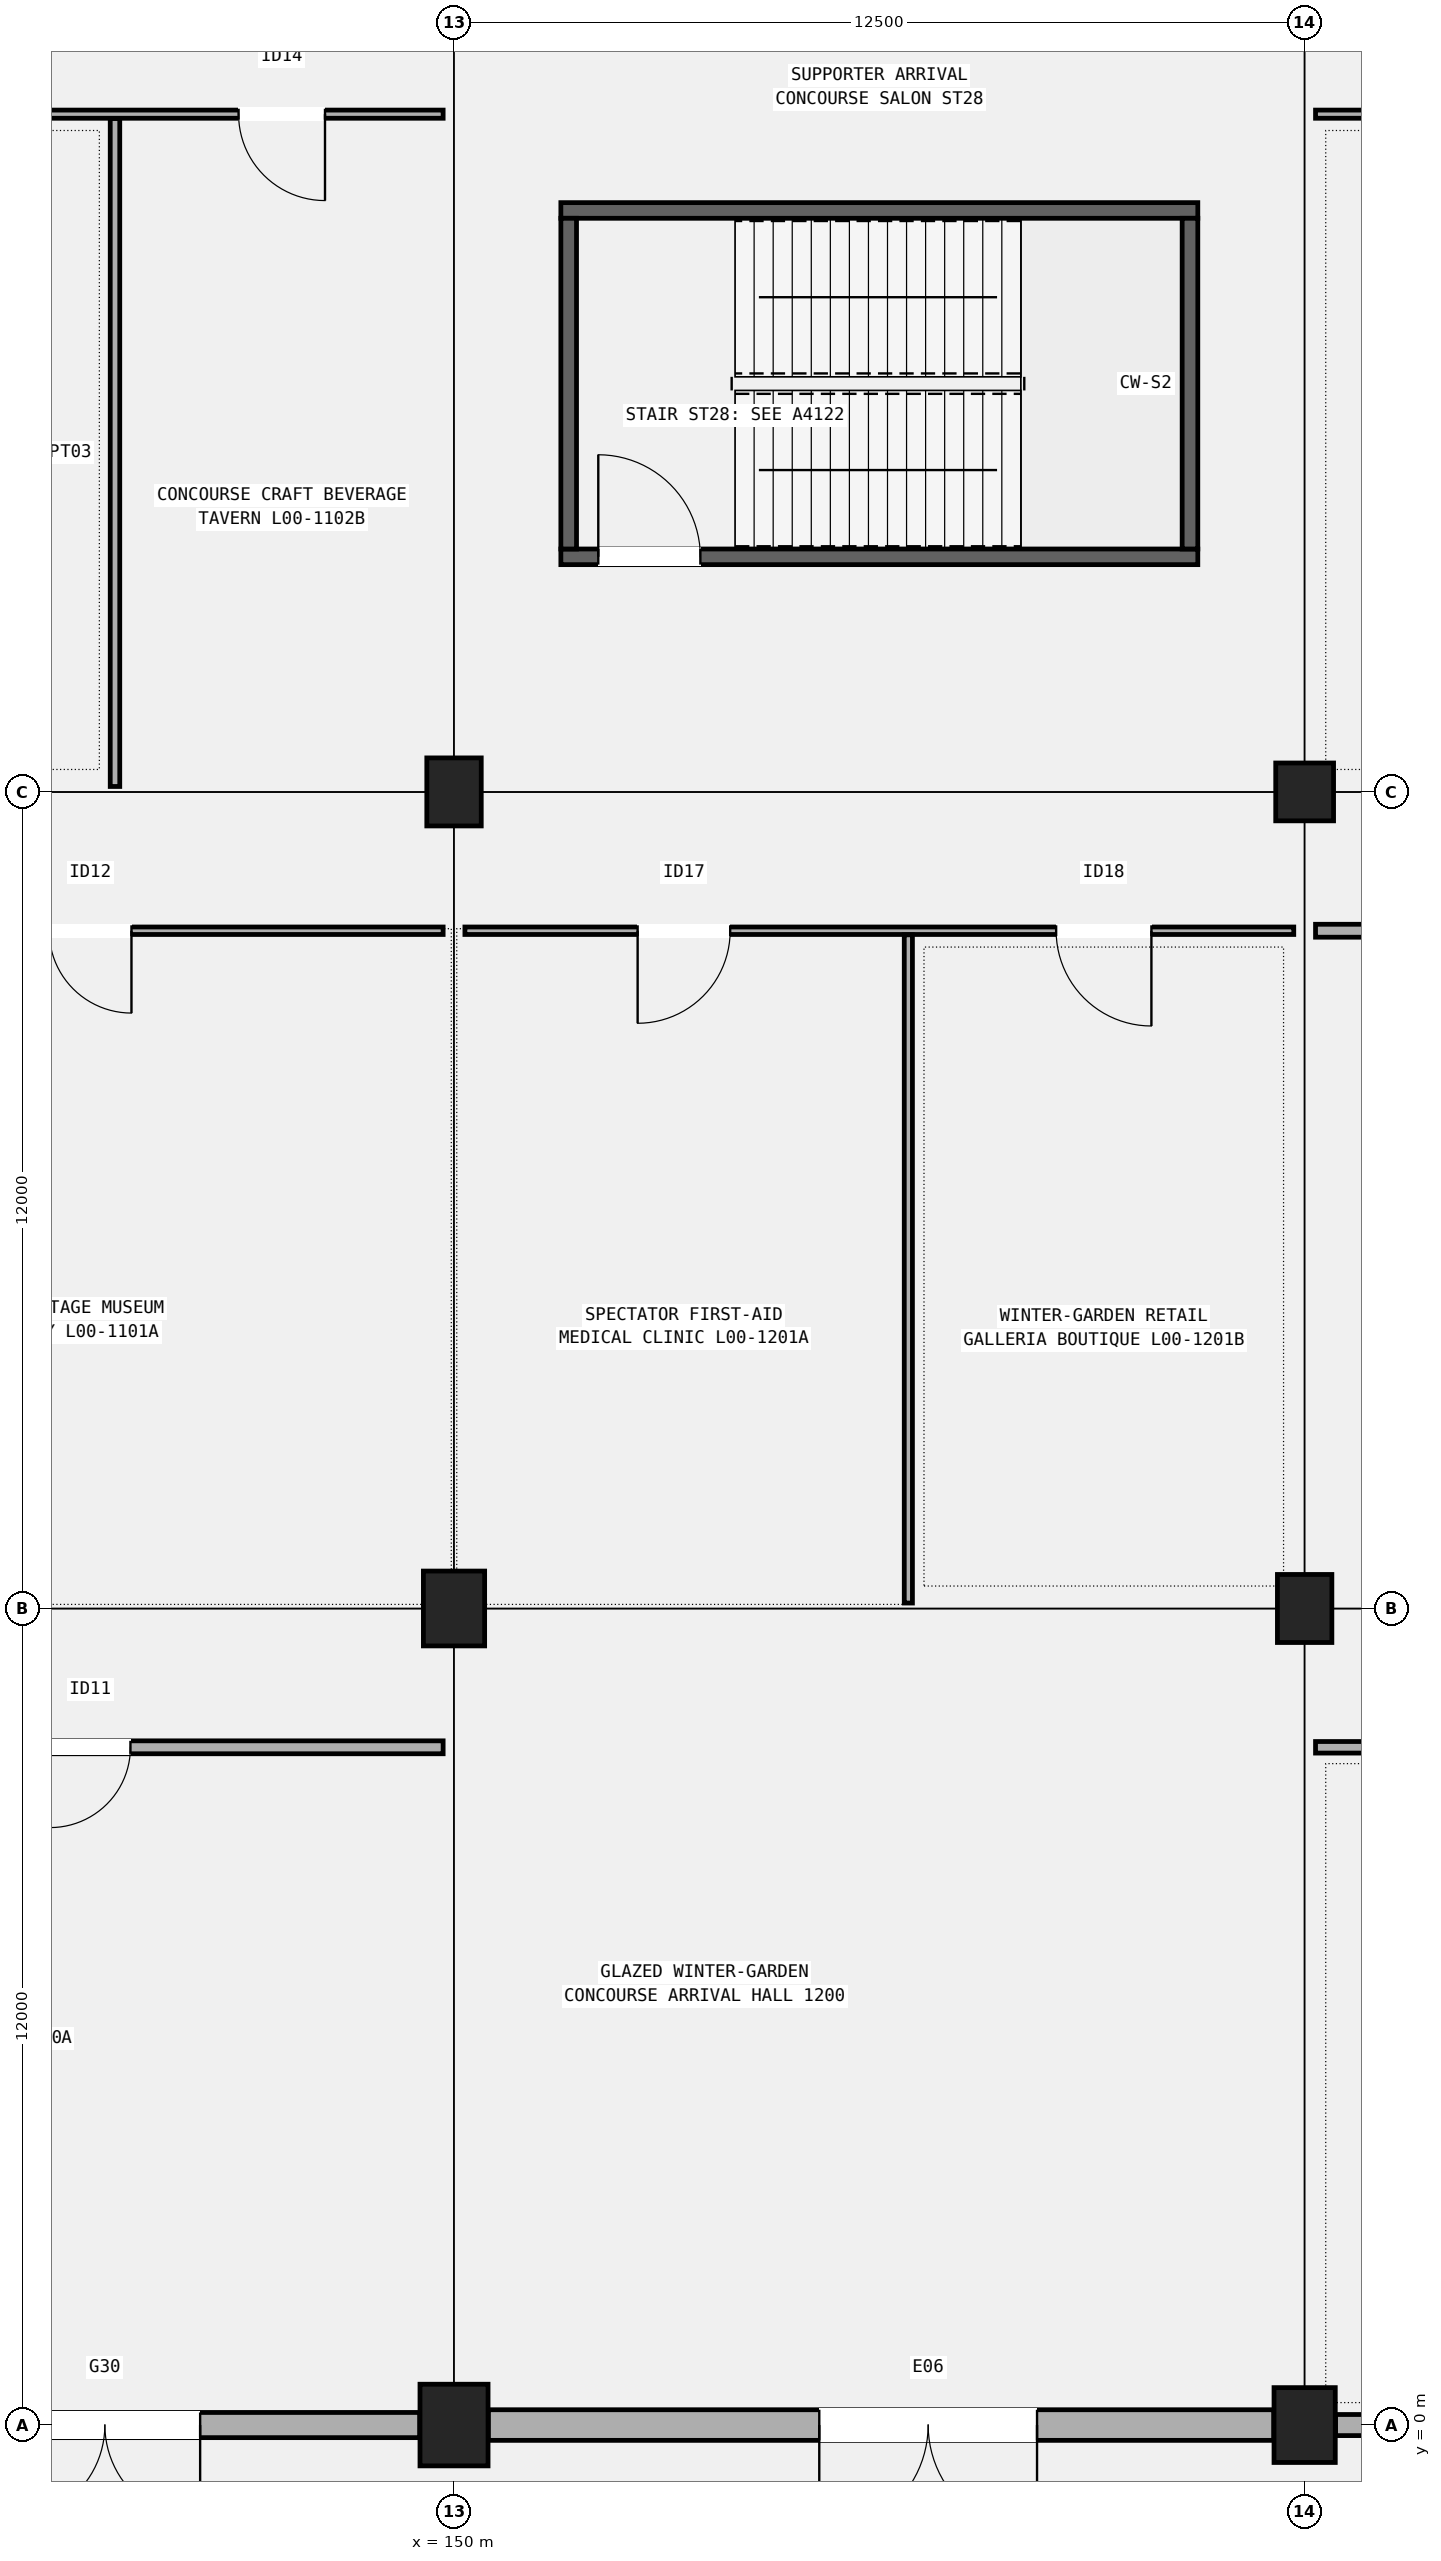
"""IFC4 building model, lengths in metres.
Left out: names, types, materials, properties, quantities, classifications, styles, units other than length and angle.
Written with IfcOpenShell. Run it as: python <this file> out.ifc"""

import sys

from ifc_helpers import new_model, si_unit, direction, frame, frame_2d, origin, origin_2d, place, context, subcontext, project, spatial, rectangle, circle, extrude, element, fill, save


model = new_model("IFC4")
c1 = context("Model", 3, precision=1e-05, world=origin(), true_north=direction((0.0, 1.0)))
c2 = subcontext(c1, "Body", "Model", "MODEL_VIEW")
j1 = project(units=[si_unit("LENGTHUNIT", "METRE"), si_unit("PLANEANGLEUNIT", "RADIAN")], contexts=[c1])
p1 = place(None, origin())
s1 = spatial("IfcSite", under=j1, at=p1, CompositionType="ELEMENT")
p2 = place(p1, origin())
s2 = spatial("IfcBuilding", under=s1, at=p2, CompositionType="ELEMENT")
p3 = place(p2, origin())
s3 = spatial("IfcBuildingStorey", under=s2, at=p3, CompositionType="ELEMENT", Elevation=0.0)
p4 = place(p3, frame((150.0, 0.0, 0.0), z_axis=(0.0, 0.0, 1.0), x_axis=(1.0, 0.0, 0.0)))
e1 = element("IfcColumn", 1, at=p4, inside=s3, PredefinedType="COLUMN", context=c2, shape_type="SweptSolid", body=[
    extrude(rectangle(XDim=1.0, YDim=1.2, at=origin_2d()), origin(), (0.0, 0.0, 1.0), 5.4),
])
p5 = place(p3, frame((150.0, 12.0, 0.0), z_axis=(0.0, 0.0, 1.0), x_axis=(1.0, 0.0, 0.0)))
e2 = element("IfcColumn", 2, at=p5, inside=s3, PredefinedType="COLUMN", context=c2, shape_type="SweptSolid", body=[
    extrude(rectangle(XDim=0.9, YDim=1.1, at=origin_2d()), origin(), (0.0, 0.0, 1.0), 5.4),
])
p6 = place(p3, frame((150.0, 24.0, 0.0), z_axis=(0.0, 0.0, 1.0), x_axis=(1.0, 0.0, 0.0)))
e3 = element("IfcColumn", 3, at=p6, inside=s3, PredefinedType="COLUMN", context=c2, shape_type="SweptSolid", body=[
    extrude(rectangle(XDim=0.8, YDim=1.0, at=origin_2d()), origin(), (0.0, 0.0, 1.0), 5.4),
])
p7 = place(p3, frame((162.5, 0.0, 0.0), z_axis=(0.0, 0.0, 1.0), x_axis=(1.0, 0.0, 0.0)))
e4 = element("IfcColumn", 4, at=p7, inside=s3, PredefinedType="COLUMN", context=c2, shape_type="SweptSolid", body=[
    extrude(rectangle(XDim=0.9, YDim=1.1, at=origin_2d()), origin(), (0.0, 0.0, 1.0), 5.4),
])
p8 = place(p3, frame((162.5, 12.0, 0.0), z_axis=(0.0, 0.0, 1.0), x_axis=(1.0, 0.0, 0.0)))
e5 = element("IfcColumn", 5, at=p8, inside=s3, PredefinedType="COLUMN", context=c2, shape_type="SweptSolid", body=[
    extrude(rectangle(XDim=0.8, YDim=1.0, at=origin_2d()), origin(), (0.0, 0.0, 1.0), 5.4),
])
p9 = place(p3, frame((162.5, 24.0, 0.0), z_axis=(0.0, 0.0, 1.0), x_axis=(1.0, 0.0, 0.0)))
e6 = element("IfcColumn", 6, at=p9, inside=s3, PredefinedType="COLUMN", context=c2, shape_type="SweptSolid", body=[
    extrude(circle(Radius=0.425, at=origin_2d()), origin(), (0.0, 0.0, 1.0), 5.4),
])
p10 = place(p3, frame((137.929, 0.0, 0.0), z_axis=(0.0, 0.0, 1.0), x_axis=(1.0, 0.0, 0.0)))
e7 = element("IfcWall", 7, at=p10, inside=s3, PredefinedType="SOLIDWALL", context=c2, shape_type="SweptSolid", body=[
    extrude(rectangle(XDim=11.567, YDim=0.37, at=frame_2d((5.784, 0.0))), origin(), (0.0, 0.0, 1.0), 4.34),
])
p11 = place(p10, frame((8.34, 0.0, 0.0), z_axis=(0.0, 0.0, 1.0), x_axis=(-1.0, 0.0, 0.0)))
e8 = element("IfcOpeningElement", 8, at=p11, cuts=e7, PredefinedType="OPENING", context=c2, shape_type="SweptSolid", body=[
    extrude(rectangle(XDim=2.8, YDim=2.4, at=frame_2d((1.4, 1.2))), frame((0.0, 0.195, 0.0), z_axis=(0.0, -1.0, 0.0), x_axis=(1.0, 0.0, 0.0)), (0.0, 0.0, 1.0), 0.39),
])
p12 = place(p3, frame((150.504, 0.0, 0.0), z_axis=(0.0, 0.0, 1.0), x_axis=(1.0, 0.0, 0.0)))
e9 = element("IfcWall", 9, at=p12, inside=s3, PredefinedType="SOLIDWALL", context=c2, shape_type="SweptSolid", body=[
    extrude(rectangle(XDim=11.542, YDim=0.45, at=frame_2d((5.771, 0.0))), origin(), (0.0, 0.0, 1.0), 4.09),
])
p13 = place(p12, frame((8.063, 0.0, 0.0), z_axis=(0.0, 0.0, 1.0), x_axis=(-1.0, 0.0, 0.0)))
e10 = element("IfcOpeningElement", 10, at=p13, cuts=e9, PredefinedType="OPENING", context=c2, shape_type="SweptSolid", body=[
    extrude(rectangle(XDim=3.2, YDim=2.6, at=frame_2d((1.6, 1.3))), frame((0.0, 0.235, 0.0), z_axis=(0.0, -1.0, 0.0), x_axis=(1.0, 0.0, 0.0)), (0.0, 0.0, 1.0), 0.47),
])
p14 = place(p3, frame((162.954, 0.0, 0.0), z_axis=(0.0, 0.0, 1.0), x_axis=(1.0, 0.0, 0.0)))
e11 = element("IfcWall", 11, at=p14, inside=s3, PredefinedType="SOLIDWALL", context=c2, shape_type="SweptSolid", body=[
    extrude(rectangle(XDim=11.642, YDim=0.31, at=frame_2d((5.821, 0.0))), origin(), (0.0, 0.0, 1.0), 4.24),
])
p15 = place(p14, frame((1.5, 0.0, 0.95)))
e12 = element("IfcOpeningElement", 12, at=p15, cuts=e11, PredefinedType="OPENING", context=c2, shape_type="SweptSolid", body=[
    extrude(rectangle(XDim=2.1, YDim=2.6, at=frame_2d((1.05, 1.3))), frame((0.0, 0.165, 0.0), z_axis=(0.0, -1.0, 0.0), x_axis=(1.0, 0.0, 0.0)), (0.0, 0.0, 1.0), 0.33),
])
p16 = place(p3, frame((151.57, 27.455, 0.0), z_axis=(0.0, 0.0, 1.0), x_axis=(1.0, 0.0, 0.0)))
e13 = element("IfcWall", 13, at=p16, inside=s3, PredefinedType="SHEAR", context=c2, shape_type="SweptSolid", body=[
    extrude(rectangle(XDim=9.36, YDim=0.23, at=frame_2d((4.68, 0.0))), origin(), (0.0, 0.0, 1.0), 5.14),
])
p17 = place(p16, frame((0.55, 0.0, 0.0)))
e14 = element("IfcOpeningElement", 14, at=p17, cuts=e13, PredefinedType="OPENING", context=c2, shape_type="SweptSolid", body=[
    extrude(rectangle(XDim=1.5, YDim=2.2, at=frame_2d((0.75, 1.1))), frame((0.0, 0.125, 0.0), z_axis=(0.0, -1.0, 0.0), x_axis=(1.0, 0.0, 0.0)), (0.0, 0.0, 1.0), 0.25),
])
p18 = place(p3, frame((151.57, 32.545, 0.0), z_axis=(0.0, 0.0, 1.0), x_axis=(1.0, 0.0, 0.0)))
e15 = element("IfcWall", 15, at=p18, inside=s3, PredefinedType="SHEAR", context=c2, shape_type="SweptSolid", body=[
    extrude(rectangle(XDim=9.36, YDim=0.23, at=frame_2d((4.68, 0.0))), origin(), (0.0, 0.0, 1.0), 5.14),
])
for number, where, z_axis, x_axis in (
    (16, (151.685, 27.57, 0.0), (0.0, 0.0, 1.0), (0.0, 1.0, 0.0)),
    (17, (160.815, 27.57, 0.0), (0.0, 0.0, 1.0), (0.0, 1.0, 0.0)),
):
    element("IfcWall", number, at=place(p3, frame(where, z_axis=z_axis, x_axis=x_axis)), inside=s3, PredefinedType="SHEAR", context=c2, shape_type="SweptSolid", body=[
        extrude(rectangle(XDim=4.86, YDim=0.23, at=frame_2d((2.43, 0.0))), origin(), (0.0, 0.0, 1.0), 5.14),
    ])
p19 = place(p3, frame((139.47, 9.96, 0.0), z_axis=(0.0, 0.0, 1.0), x_axis=(1.0, 0.0, 0.0)))
e18 = element("IfcWall", 18, at=p19, inside=s3, PredefinedType="PARTITIONING", context=c2, shape_type="SweptSolid", body=[
    extrude(rectangle(XDim=10.37, YDim=0.19, at=frame_2d((5.185, 0.0))), origin(), (0.0, 0.0, 1.0), 4.52),
])
p20 = place(p19, frame((5.775, 0.0, 0.0), z_axis=(0.0, 0.0, 1.0), x_axis=(-1.0, 0.0, 0.0)))
e19 = element("IfcOpeningElement", 19, at=p20, cuts=e18, PredefinedType="OPENING", context=c2, shape_type="SweptSolid", body=[
    extrude(rectangle(XDim=1.18, YDim=2.2, at=frame_2d((0.59, 1.1))), frame((0.0, 0.105, 0.0), z_axis=(0.0, -1.0, 0.0), x_axis=(1.0, 0.0, 0.0)), (0.0, 0.0, 1.0), 0.21),
])
p21 = place(p3, frame((139.47, 21.96, 0.0), z_axis=(0.0, 0.0, 1.0), x_axis=(1.0, 0.0, 0.0)))
e20 = element("IfcWall", 20, at=p21, inside=s3, PredefinedType="PARTITIONING", context=c2, shape_type="SweptSolid", body=[
    extrude(rectangle(XDim=10.37, YDim=0.11, at=frame_2d((5.185, 0.0))), origin(), (0.0, 0.0, 1.0), 4.52),
])
p22 = place(p21, frame((5.79, 0.0, 0.0), z_axis=(0.0, 0.0, 1.0), x_axis=(-1.0, 0.0, 0.0)))
e21 = element("IfcOpeningElement", 21, at=p22, cuts=e20, PredefinedType="OPENING", context=c2, shape_type="SweptSolid", body=[
    extrude(rectangle(XDim=1.21, YDim=2.18, at=frame_2d((0.605, 1.09))), frame((0.0, 0.065, 0.0), z_axis=(0.0, -1.0, 0.0), x_axis=(1.0, 0.0, 0.0)), (0.0, 0.0, 1.0), 0.13),
])
p23 = place(p3, frame((139.47, 33.96, 0.0), z_axis=(0.0, 0.0, 1.0), x_axis=(1.0, 0.0, 0.0)))
e22 = element("IfcWall", 22, at=p23, inside=s3, PredefinedType="PARTITIONING", context=c2, shape_type="SweptSolid", body=[
    extrude(rectangle(XDim=10.37, YDim=0.12, at=frame_2d((5.185, 0.0))), origin(), (0.0, 0.0, 1.0), 4.52),
])
p24 = place(p23, frame((3.354, 0.0, 0.0), z_axis=(0.0, 0.0, 1.0), x_axis=(-1.0, 0.0, 0.0)))
e23 = element("IfcOpeningElement", 23, at=p24, cuts=e22, PredefinedType="OPENING", context=c2, shape_type="SweptSolid", body=[
    extrude(rectangle(XDim=1.24, YDim=2.22, at=frame_2d((0.62, 1.11))), frame((0.0, 0.07, 0.0), z_axis=(0.0, -1.0, 0.0), x_axis=(1.0, 0.0, 0.0)), (0.0, 0.0, 1.0), 0.14),
])
p25 = place(p23, frame((8.634, 0.0, 0.0), z_axis=(0.0, 0.0, 1.0), x_axis=(-1.0, 0.0, 0.0)))
e24 = element("IfcOpeningElement", 24, at=p25, cuts=e22, PredefinedType="OPENING", context=c2, shape_type="SweptSolid", body=[
    extrude(rectangle(XDim=1.27, YDim=2.2, at=frame_2d((0.635, 1.1))), frame((0.0, 0.07, 0.0), z_axis=(0.0, -1.0, 0.0), x_axis=(1.0, 0.0, 0.0)), (0.0, 0.0, 1.0), 0.14),
])
p26 = place(p3, frame((145.018, 24.08, 0.0), z_axis=(0.0, 0.0, 1.0), x_axis=(0.0, 1.0, 0.0)))
e25 = element("IfcWall", 25, at=p26, inside=s3, PredefinedType="PARTITIONING", context=c2, shape_type="SweptSolid", body=[
    extrude(rectangle(XDim=9.815, YDim=0.14, at=frame_2d((4.907, 0.0))), origin(), (0.0, 0.0, 1.0), 4.52),
])
p27 = place(p3, frame((150.16, 21.96, 0.0), z_axis=(0.0, 0.0, 1.0), x_axis=(1.0, 0.0, 0.0)))
e26 = element("IfcWall", 26, at=p27, inside=s3, PredefinedType="PARTITIONING", context=c2, shape_type="SweptSolid", body=[
    extrude(rectangle(XDim=12.18, YDim=0.11, at=frame_2d((6.09, 0.0))), origin(), (0.0, 0.0, 1.0), 4.52),
])
p28 = place(p27, frame((3.898, 0.0, 0.0), z_axis=(0.0, 0.0, 1.0), x_axis=(-1.0, 0.0, 0.0)))
e27 = element("IfcOpeningElement", 27, at=p28, cuts=e26, PredefinedType="OPENING", context=c2, shape_type="SweptSolid", body=[
    extrude(rectangle(XDim=1.36, YDim=2.25, at=frame_2d((0.68, 1.125))), frame((0.0, 0.065, 0.0), z_axis=(0.0, -1.0, 0.0), x_axis=(1.0, 0.0, 0.0)), (0.0, 0.0, 1.0), 0.13),
])
p29 = place(p27, frame((10.088, 0.0, 0.0), z_axis=(0.0, 0.0, 1.0), x_axis=(-1.0, 0.0, 0.0)))
e28 = element("IfcOpeningElement", 28, at=p29, cuts=e26, PredefinedType="OPENING", context=c2, shape_type="SweptSolid", body=[
    extrude(rectangle(XDim=1.4, YDim=2.24, at=frame_2d((0.7, 1.12))), frame((0.0, 0.065, 0.0), z_axis=(0.0, -1.0, 0.0), x_axis=(1.0, 0.0, 0.0)), (0.0, 0.0, 1.0), 0.13),
])
p30 = place(p3, frame((156.676, 12.08, 0.0), z_axis=(0.0, 0.0, 1.0), x_axis=(0.0, 1.0, 0.0)))
e29 = element("IfcWall", 29, at=p30, inside=s3, PredefinedType="PARTITIONING", context=c2, shape_type="SweptSolid", body=[
    extrude(rectangle(XDim=9.82, YDim=0.12, at=frame_2d((4.91, 0.0))), origin(), (0.0, 0.0, 1.0), 4.52),
])
p31 = place(p3, frame((162.66, 9.96, 0.0), z_axis=(0.0, 0.0, 1.0), x_axis=(1.0, 0.0, 0.0)))
e30 = element("IfcWall", 30, at=p31, inside=s3, PredefinedType="PARTITIONING", context=c2, shape_type="SweptSolid", body=[
    extrude(rectangle(XDim=12.198, YDim=0.17, at=frame_2d((6.099, 0.0))), origin(), (0.0, 0.0, 1.0), 4.52),
])
p32 = place(p31, frame((6.85, 0.0, 0.0), z_axis=(0.0, 0.0, 1.0), x_axis=(-1.0, 0.0, 0.0)))
e31 = element("IfcOpeningElement", 31, at=p32, cuts=e30, PredefinedType="OPENING", context=c2, shape_type="SweptSolid", body=[
    extrude(rectangle(XDim=1.52, YDim=2.28, at=frame_2d((0.76, 1.14))), frame((0.0, 0.095, 0.0), z_axis=(0.0, -1.0, 0.0), x_axis=(1.0, 0.0, 0.0)), (0.0, 0.0, 1.0), 0.19),
])
p33 = place(p3, frame((162.66, 21.96, 0.0), z_axis=(0.0, 0.0, 1.0), x_axis=(1.0, 0.0, 0.0)))
e32 = element("IfcWall", 32, at=p33, inside=s3, PredefinedType="PARTITIONING", context=c2, shape_type="SweptSolid", body=[
    extrude(rectangle(XDim=12.18, YDim=0.19, at=frame_2d((6.09, 0.0))), origin(), (0.0, 0.0, 1.0), 4.52),
])
p34 = place(p33, frame((3.998, 0.0, 0.0), z_axis=(0.0, 0.0, 1.0), x_axis=(-1.0, 0.0, 0.0)))
e33 = element("IfcOpeningElement", 33, at=p34, cuts=e32, PredefinedType="OPENING", context=c2, shape_type="SweptSolid", body=[
    extrude(rectangle(XDim=1.56, YDim=2.26, at=frame_2d((0.78, 1.13))), frame((0.0, 0.105, 0.0), z_axis=(0.0, -1.0, 0.0), x_axis=(1.0, 0.0, 0.0)), (0.0, 0.0, 1.0), 0.21),
])
p35 = place(p33, frame((10.188, 0.0, 0.0), z_axis=(0.0, 0.0, 1.0), x_axis=(-1.0, 0.0, 0.0)))
e34 = element("IfcOpeningElement", 34, at=p35, cuts=e32, PredefinedType="OPENING", context=c2, shape_type="SweptSolid", body=[
    extrude(rectangle(XDim=1.6, YDim=2.3, at=frame_2d((0.8, 1.15))), frame((0.0, 0.105, 0.0), z_axis=(0.0, -1.0, 0.0), x_axis=(1.0, 0.0, 0.0)), (0.0, 0.0, 1.0), 0.21),
])
p36 = place(p3, frame((162.66, 33.96, 0.0), z_axis=(0.0, 0.0, 1.0), x_axis=(1.0, 0.0, 0.0)))
e35 = element("IfcWall", 35, at=p36, inside=s3, PredefinedType="PARTITIONING", context=c2, shape_type="SweptSolid", body=[
    extrude(rectangle(XDim=12.18, YDim=0.12, at=frame_2d((6.09, 0.0))), origin(), (0.0, 0.0, 1.0), 4.52),
])
p37 = place(p36, frame((6.915, 0.0, 0.0), z_axis=(0.0, 0.0, 1.0), x_axis=(-1.0, 0.0, 0.0)))
e36 = element("IfcOpeningElement", 36, at=p37, cuts=e35, PredefinedType="OPENING", context=c2, shape_type="SweptSolid", body=[
    extrude(rectangle(XDim=1.65, YDim=2.28, at=frame_2d((0.825, 1.14))), frame((0.0, 0.07, 0.0), z_axis=(0.0, -1.0, 0.0), x_axis=(1.0, 0.0, 0.0)), (0.0, 0.0, 1.0), 0.14),
])
p38 = place(p11, origin())
e37 = element("IfcDoor", 37, at=p38, inside=s3, OperationType="DOUBLE_DOOR_SINGLE_SWING", PredefinedType="DOOR", context=c2, shape_type="SweptSolid", body=[
    extrude(rectangle(XDim=2.8, YDim=2.4, at=frame_2d((1.4, 1.2))), frame((0.0, 0.025, 0.0), z_axis=(0.0, -1.0, 0.0), x_axis=(1.0, 0.0, 0.0)), (0.0, 0.0, 1.0), 0.05),
])
fill(e8, e37)
p39 = place(p13, origin())
e38 = element("IfcDoor", 38, at=p39, inside=s3, OperationType="DOUBLE_DOOR_SINGLE_SWING", PredefinedType="DOOR", context=c2, shape_type="SweptSolid", body=[
    extrude(rectangle(XDim=3.2, YDim=2.6, at=frame_2d((1.6, 1.3))), frame((0.0, 0.025, 0.0), z_axis=(0.0, -1.0, 0.0), x_axis=(1.0, 0.0, 0.0)), (0.0, 0.0, 1.0), 0.05),
])
fill(e10, e38)
p40 = place(p17, origin())
e39 = element("IfcDoor", 39, at=p40, inside=s3, OperationType="SINGLE_SWING_LEFT", PredefinedType="DOOR", context=c2, shape_type="SweptSolid", body=[
    extrude(rectangle(XDim=1.5, YDim=2.2, at=frame_2d((0.75, 1.1))), frame((0.0, 0.025, 0.0), z_axis=(0.0, -1.0, 0.0), x_axis=(1.0, 0.0, 0.0)), (0.0, 0.0, 1.0), 0.05),
])
fill(e14, e39)
p41 = place(p20, origin())
e40 = element("IfcDoor", 40, at=p41, inside=s3, OperationType="SINGLE_SWING_RIGHT", PredefinedType="DOOR", context=c2, shape_type="SweptSolid", body=[
    extrude(rectangle(XDim=1.18, YDim=2.2, at=frame_2d((0.59, 1.1))), frame((0.0, 0.025, 0.0), z_axis=(0.0, -1.0, 0.0), x_axis=(1.0, 0.0, 0.0)), (0.0, 0.0, 1.0), 0.05),
])
fill(e19, e40)
p42 = place(p22, origin())
e41 = element("IfcDoor", 41, at=p42, inside=s3, OperationType="SINGLE_SWING_LEFT", PredefinedType="DOOR", context=c2, shape_type="SweptSolid", body=[
    extrude(rectangle(XDim=1.21, YDim=2.18, at=frame_2d((0.605, 1.09))), frame((0.0, 0.025, 0.0), z_axis=(0.0, -1.0, 0.0), x_axis=(1.0, 0.0, 0.0)), (0.0, 0.0, 1.0), 0.05),
])
fill(e21, e41)
p43 = place(p25, origin())
e42 = element("IfcDoor", 42, at=p43, inside=s3, OperationType="SINGLE_SWING_LEFT", PredefinedType="DOOR", context=c2, shape_type="SweptSolid", body=[
    extrude(rectangle(XDim=1.27, YDim=2.2, at=frame_2d((0.635, 1.1))), frame((0.0, 0.025, 0.0), z_axis=(0.0, -1.0, 0.0), x_axis=(1.0, 0.0, 0.0)), (0.0, 0.0, 1.0), 0.05),
])
fill(e24, e42)
p44 = place(p28, origin())
e43 = element("IfcDoor", 43, at=p44, inside=s3, OperationType="SINGLE_SWING_RIGHT", PredefinedType="DOOR", context=c2, shape_type="SweptSolid", body=[
    extrude(rectangle(XDim=1.36, YDim=2.25, at=frame_2d((0.68, 1.125))), frame((0.0, 0.025, 0.0), z_axis=(0.0, -1.0, 0.0), x_axis=(1.0, 0.0, 0.0)), (0.0, 0.0, 1.0), 0.05),
])
fill(e27, e43)
p45 = place(p29, origin())
e44 = element("IfcDoor", 44, at=p45, inside=s3, OperationType="SINGLE_SWING_LEFT", PredefinedType="DOOR", context=c2, shape_type="SweptSolid", body=[
    extrude(rectangle(XDim=1.4, YDim=2.24, at=frame_2d((0.7, 1.12))), frame((0.0, 0.025, 0.0), z_axis=(0.0, -1.0, 0.0), x_axis=(1.0, 0.0, 0.0)), (0.0, 0.0, 1.0), 0.05),
])
fill(e28, e44)
save(model, sys.argv[1])
